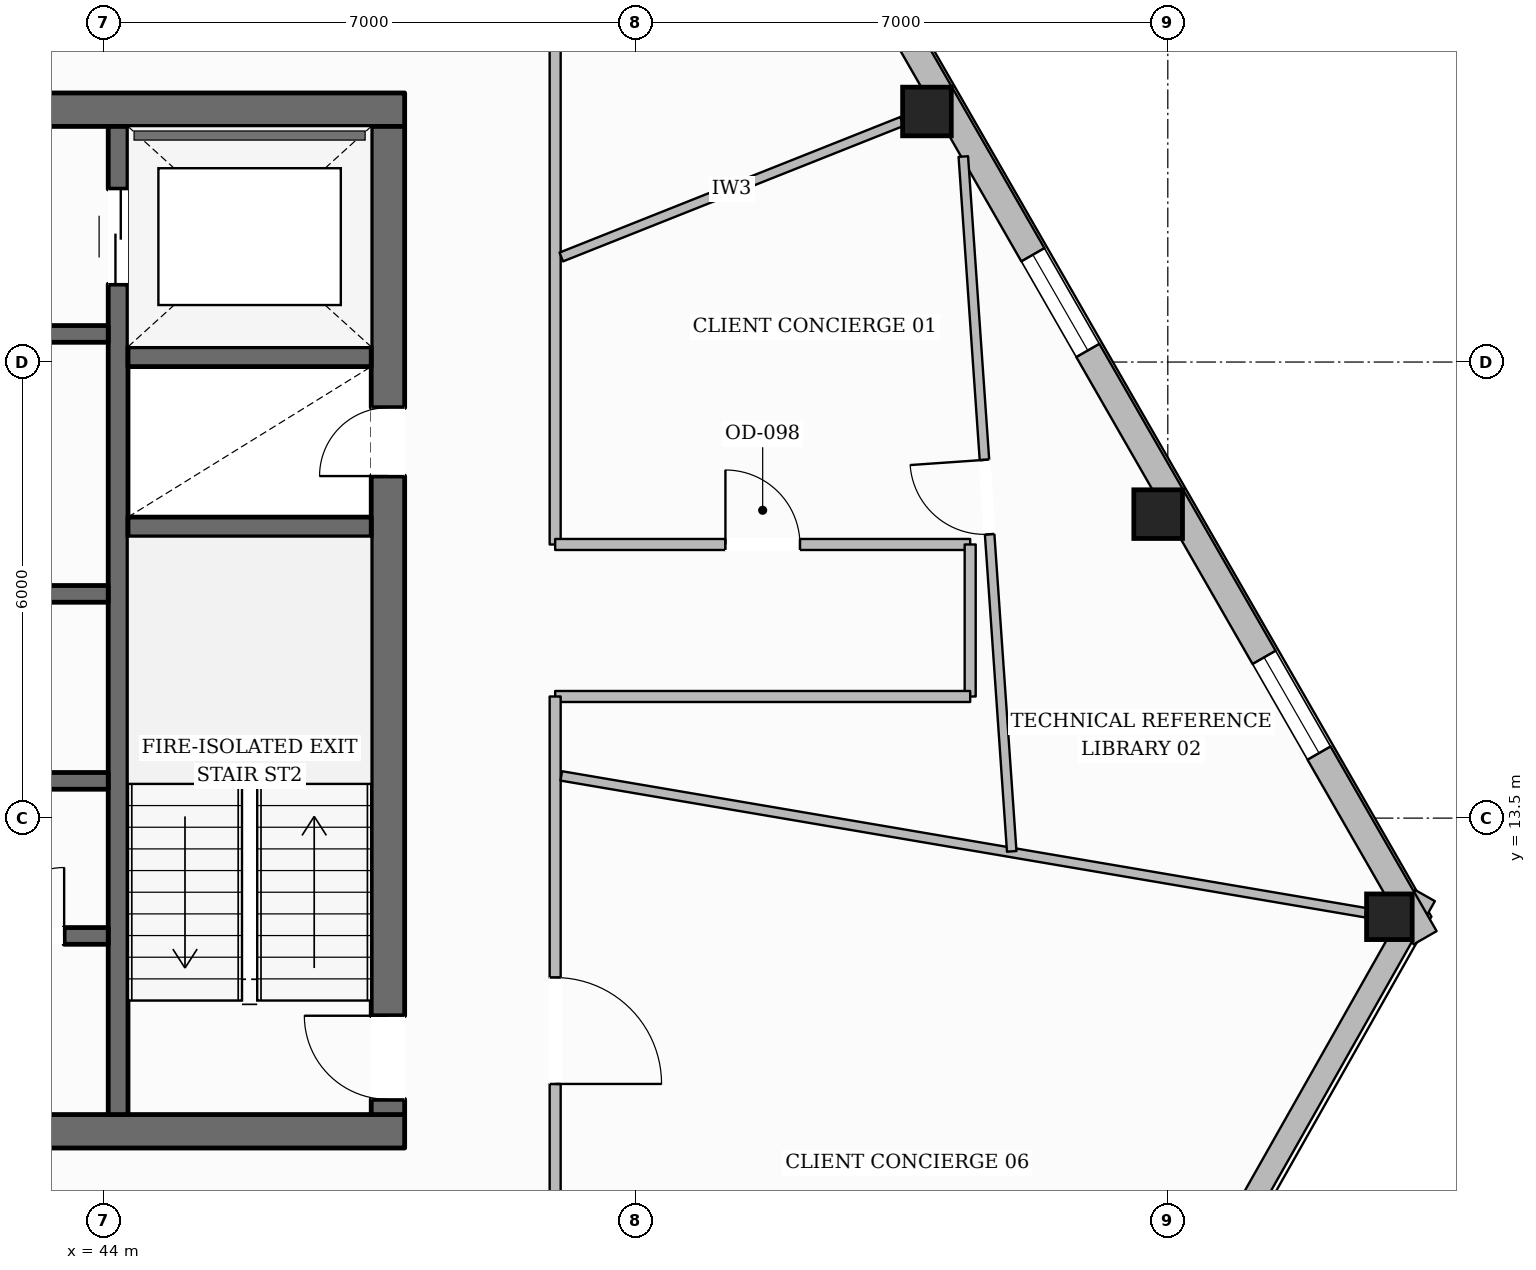
"""IFC4 building model, lengths in metres.
Left out: names, types, materials, properties, quantities, classifications, styles, units other than length and angle.
Written with IfcOpenShell. Run it as: python <this file> out.ifc"""

import sys

from ifc_helpers import new_model, si_unit, direction, frame, frame_2d, origin, origin_2d, place, context, subcontext, project, spatial, rectangle, hollow_rectangle, extrude, element, fill, save


model = new_model("IFC4")
c1 = context("Model", 3, precision=1e-05, world=origin(), true_north=direction((0.0, 1.0)))
c2 = subcontext(c1, "Body", "Model", "MODEL_VIEW")
j1 = project(units=[si_unit("LENGTHUNIT", "METRE"), si_unit("PLANEANGLEUNIT", "RADIAN")], contexts=[c1])
p1 = place(None, origin())
s1 = spatial("IfcSite", under=j1, at=p1, CompositionType="ELEMENT")
p2 = place(p1, origin())
s2 = spatial("IfcBuilding", under=s1, at=p2, CompositionType="ELEMENT")
p3 = place(p2, frame((0.0, 0.0, 172.7)))
s3 = spatial("IfcBuildingStorey", under=s2, at=p3, CompositionType="ELEMENT", Elevation=172.7)
p4 = place(p3, frame((28.04, 9.38, 0.0), z_axis=(0.0, 0.0, 1.0), x_axis=(1.0, 0.0, 0.0)))
e1 = element("IfcWall", 1, at=p4, inside=s3, PredefinedType="SOLIDWALL", context=c2, shape_type="SweptSolid", body=[
    extrude(rectangle(XDim=19.92, YDim=0.44, at=frame_2d((9.96, 0.0))), origin(), (0.0, 0.0, 1.0), 3.6),
])
p5 = place(p4, frame((10.46, 0.0, 0.0)))
e2 = element("IfcOpeningElement", 2, at=p5, cuts=e1, PredefinedType="OPENING", context=c2, shape_type="SweptSolid", body=[
    extrude(rectangle(XDim=1.4, YDim=2.2, at=frame_2d((0.7, 1.1))), frame((0.0, 0.23, 0.0), z_axis=(0.0, -1.0, 0.0), x_axis=(1.0, 0.0, 0.0)), (0.0, 0.0, 1.0), 0.46),
])
p6 = place(p3, frame((28.04, 22.82, 0.0), z_axis=(0.0, 0.0, 1.0), x_axis=(1.0, 0.0, 0.0)))
e3 = element("IfcWall", 3, at=p6, inside=s3, PredefinedType="SOLIDWALL", context=c2, shape_type="SweptSolid", body=[
    extrude(rectangle(XDim=19.92, YDim=0.44, at=frame_2d((9.96, 0.0))), origin(), (0.0, 0.0, 1.0), 3.6),
])
p7 = place(p6, frame((6.235, 0.0, 0.0)))
e4 = element("IfcOpeningElement", 4, at=p7, cuts=e3, PredefinedType="OPENING", context=c2, shape_type="SweptSolid", body=[
    extrude(rectangle(XDim=1.05, YDim=2.15, at=frame_2d((0.525, 1.075))), frame((0.0, 0.23, 0.0), z_axis=(0.0, -1.0, 0.0), x_axis=(1.0, 0.0, 0.0)), (0.0, 0.0, 1.0), 0.46),
])
p8 = place(p6, frame((12.635, 0.0, 0.0)))
e5 = element("IfcOpeningElement", 5, at=p8, cuts=e3, PredefinedType="OPENING", context=c2, shape_type="SweptSolid", body=[
    extrude(rectangle(XDim=1.05, YDim=2.15, at=frame_2d((0.525, 1.075))), frame((0.0, 0.23, 0.0), z_axis=(0.0, -1.0, 0.0), x_axis=(1.0, 0.0, 0.0)), (0.0, 0.0, 1.0), 0.46),
])
p9 = place(p3, frame((47.74, 9.6, 0.0), z_axis=(0.0, 0.0, 1.0), x_axis=(0.0, 1.0, 0.0)))
e6 = element("IfcWall", 6, at=p9, inside=s3, PredefinedType="SOLIDWALL", context=c2, shape_type="SweptSolid", body=[
    extrude(rectangle(XDim=13.0, YDim=0.44, at=frame_2d((6.5, 0.0))), origin(), (0.0, 0.0, 1.0), 3.6),
])
p10 = place(p9, frame((0.2, 0.0, 0.0)))
e7 = element("IfcOpeningElement", 7, at=p10, cuts=e6, PredefinedType="OPENING", context=c2, shape_type="SweptSolid", body=[
    extrude(rectangle(XDim=1.1, YDim=2.15, at=frame_2d((0.55, 1.075))), frame((0.0, 0.23, 0.0), z_axis=(0.0, -1.0, 0.0), x_axis=(1.0, 0.0, 0.0)), (0.0, 0.0, 1.0), 0.46),
])
p11 = place(p9, frame((8.4, 0.0, 0.0)))
e8 = element("IfcOpeningElement", 8, at=p11, cuts=e6, PredefinedType="OPENING", context=c2, shape_type="SweptSolid", body=[
    extrude(rectangle(XDim=0.9, YDim=2.1, at=frame_2d((0.45, 1.05))), frame((0.0, 0.23, 0.0), z_axis=(0.0, -1.0, 0.0), x_axis=(1.0, 0.0, 0.0)), (0.0, 0.0, 1.0), 0.46),
])
p12 = place(p3, frame((44.19, 9.6, 0.0), z_axis=(0.0, 0.0, 1.0), x_axis=(0.0, 1.0, 0.0)))
e9 = element("IfcWall", 9, at=p12, inside=s3, PredefinedType="SHEAR", context=c2, shape_type="SweptSolid", body=[
    extrude(rectangle(XDim=13.0, YDim=0.26, at=frame_2d((6.5, 0.0))), origin(), (0.0, 0.0, 1.0), 3.6),
])
p13 = place(p12, frame((10.925, 0.0, 0.0)))
e10 = element("IfcOpeningElement", 10, at=p13, cuts=e9, PredefinedType="OPENING", context=c2, shape_type="SweptSolid", body=[
    extrude(rectangle(XDim=1.25, YDim=2.25, at=frame_2d((0.625, 1.125))), frame((0.0, 0.14, 0.0), z_axis=(0.0, -1.0, 0.0), x_axis=(1.0, 0.0, 0.0)), (0.0, 0.0, 1.0), 0.28),
])
for number, where, z_axis, x_axis in (
    (11, (44.32, 17.33, 0.0), (0.0, 0.0, 1.0), (1.0, 0.0, 0.0)),
    (12, (44.32, 19.57, 0.0), (0.0, 0.0, 1.0), (1.0, 0.0, 0.0)),
):
    element("IfcWall", number, at=place(p3, frame(where, z_axis=z_axis, x_axis=x_axis)), inside=s3, PredefinedType="SHEAR", context=c2, shape_type="SweptSolid", body=[
        extrude(rectangle(XDim=3.2, YDim=0.26, at=frame_2d((1.6, 0.0))), origin(), (0.0, 0.0, 1.0), 3.6),
    ])
p14 = place(p3, frame((31.94, 19.87, 0.0), z_axis=(0.0, 0.0, 1.0), x_axis=(1.0, 0.0, 0.0)))
e13 = element("IfcWall", 13, at=p14, inside=s3, PredefinedType="SOLIDWALL", context=c2, shape_type="SweptSolid", body=[
    extrude(rectangle(XDim=12.12, YDim=0.22, at=frame_2d((6.06, 0.0))), origin(), (0.0, 0.0, 1.0), 3.6),
])
p15 = place(p14, frame((6.3, 0.0, 0.0)))
e14 = element("IfcOpeningElement", 14, at=p15, cuts=e13, PredefinedType="OPENING", context=c2, shape_type="SweptSolid", body=[
    extrude(rectangle(XDim=1.1, YDim=2.15, at=frame_2d((0.55, 1.075))), frame((0.0, 0.12, 0.0), z_axis=(0.0, -1.0, 0.0), x_axis=(1.0, 0.0, 0.0)), (0.0, 0.0, 1.0), 0.24),
])
p16 = place(p14, frame((8.01, 0.0, 0.0)))
e15 = element("IfcOpeningElement", 15, at=p16, cuts=e13, PredefinedType="OPENING", context=c2, shape_type="SweptSolid", body=[
    extrude(rectangle(XDim=0.9, YDim=2.1, at=frame_2d((0.45, 1.05))), frame((0.0, 0.12, 0.0), z_axis=(0.0, -1.0, 0.0), x_axis=(1.0, 0.0, 0.0)), (0.0, 0.0, 1.0), 0.24),
])
p17 = place(p14, frame((10.21, 0.0, 0.0)))
e16 = element("IfcOpeningElement", 16, at=p17, cuts=e13, PredefinedType="OPENING", context=c2, shape_type="SweptSolid", body=[
    extrude(rectangle(XDim=0.9, YDim=2.1, at=frame_2d((0.45, 1.05))), frame((0.0, 0.12, 0.0), z_axis=(0.0, -1.0, 0.0), x_axis=(1.0, 0.0, 0.0)), (0.0, 0.0, 1.0), 0.24),
])
p18 = place(p3, frame((31.94, 16.45, 0.0), z_axis=(0.0, 0.0, 1.0), x_axis=(1.0, 0.0, 0.0)))
e17 = element("IfcWall", 17, at=p18, inside=s3, PredefinedType="SOLIDWALL", context=c2, shape_type="SweptSolid", body=[
    extrude(rectangle(XDim=12.12, YDim=0.22, at=frame_2d((6.06, 0.0))), origin(), (0.0, 0.0, 1.0), 3.6),
])
p19 = place(p3, frame((31.94, 13.99, 0.0), z_axis=(0.0, 0.0, 1.0), x_axis=(1.0, 0.0, 0.0)))
e18 = element("IfcWall", 18, at=p19, inside=s3, PredefinedType="SOLIDWALL", context=c2, shape_type="SweptSolid", body=[
    extrude(rectangle(XDim=12.12, YDim=0.22, at=frame_2d((6.06, 0.0))), origin(), (0.0, 0.0, 1.0), 3.6),
])
p20 = place(p19, frame((1.11, 0.0, 0.0)))
e19 = element("IfcOpeningElement", 19, at=p20, cuts=e18, PredefinedType="OPENING", context=c2, shape_type="SweptSolid", body=[
    extrude(rectangle(XDim=0.9, YDim=2.1, at=frame_2d((0.45, 1.05))), frame((0.0, 0.12, 0.0), z_axis=(0.0, -1.0, 0.0), x_axis=(1.0, 0.0, 0.0)), (0.0, 0.0, 1.0), 0.24),
])
p21 = place(p19, frame((5.16, 0.0, 0.0)))
e20 = element("IfcOpeningElement", 20, at=p21, cuts=e18, PredefinedType="OPENING", context=c2, shape_type="SweptSolid", body=[
    extrude(rectangle(XDim=0.9, YDim=2.1, at=frame_2d((0.45, 1.05))), frame((0.0, 0.12, 0.0), z_axis=(0.0, -1.0, 0.0), x_axis=(1.0, 0.0, 0.0)), (0.0, 0.0, 1.0), 0.24),
])
p22 = place(p19, frame((9.61, 0.0, 0.0)))
e21 = element("IfcOpeningElement", 21, at=p22, cuts=e18, PredefinedType="OPENING", context=c2, shape_type="SweptSolid", body=[
    extrude(rectangle(XDim=0.9, YDim=2.1, at=frame_2d((0.45, 1.05))), frame((0.0, 0.12, 0.0), z_axis=(0.0, -1.0, 0.0), x_axis=(1.0, 0.0, 0.0)), (0.0, 0.0, 1.0), 0.24),
])
p23 = place(p3, frame((40.28, 11.95, 0.0), z_axis=(0.0, 0.0, 1.0), x_axis=(1.0, 0.0, 0.0)))
e22 = element("IfcWall", 22, at=p23, inside=s3, PredefinedType="SOLIDWALL", context=c2, shape_type="SweptSolid", body=[
    extrude(rectangle(XDim=3.78, YDim=0.22, at=frame_2d((1.89, 0.0))), origin(), (0.0, 0.0, 1.0), 3.6),
])
p24 = place(p23, frame((0.47, 0.0, 0.0)))
e23 = element("IfcOpeningElement", 23, at=p24, cuts=e22, PredefinedType="OPENING", context=c2, shape_type="SweptSolid", body=[
    extrude(rectangle(XDim=0.9, YDim=2.1, at=frame_2d((0.45, 1.05))), frame((0.0, 0.12, 0.0), z_axis=(0.0, -1.0, 0.0), x_axis=(1.0, 0.0, 0.0)), (0.0, 0.0, 1.0), 0.24),
])
p25 = place(p23, frame((2.3, 0.0, 0.0)))
e24 = element("IfcOpeningElement", 24, at=p25, cuts=e22, PredefinedType="OPENING", context=c2, shape_type="SweptSolid", body=[
    extrude(rectangle(XDim=0.9, YDim=2.1, at=frame_2d((0.45, 1.05))), frame((0.0, 0.12, 0.0), z_axis=(0.0, -1.0, 0.0), x_axis=(1.0, 0.0, 0.0)), (0.0, 0.0, 1.0), 0.24),
])
p26 = place(p3, frame((60.915, 12.202, 0.0), z_axis=(0.0, 0.0, 1.0), x_axis=(1.0, 0.0, 0.0)))
e25 = element("IfcColumn", 25, at=p26, inside=s3, PredefinedType="COLUMN", context=c2, shape_type="SweptSolid", body=[
    extrude(hollow_rectangle(XDim=0.6, YDim=0.6, WallThickness=0.028, at=origin_2d()), origin(), (0.0, 0.0, 1.0), 3.6),
])
for number, where, z_axis, x_axis in (
    (26, (57.873, 17.499, 0.0), (0.0, 0.0, 1.0), (1.0, 0.0, 0.0)),
    (27, (54.831, 22.796, 0.0), (0.0, 0.0, 1.0), (1.0, 0.0, 0.0)),
):
    element("IfcColumn", number, at=place(p3, frame(where, z_axis=z_axis, x_axis=x_axis)), inside=s3, PredefinedType="COLUMN", context=c2, shape_type="SweptSolid", body=[
        extrude(hollow_rectangle(XDim=0.64, YDim=0.64, WallThickness=0.028, at=origin_2d()), origin(), (0.0, 0.0, 1.0), 3.6),
    ])
p27 = place(p3, frame((61.383, 12.481, 0.0), z_axis=(0.0, 0.0, 1.0), x_axis=(-0.492449334401, -0.87034111304, 0.0)))
e28 = element("IfcWall", 28, at=p27, inside=s3, PredefinedType="STANDARD", context=c2, shape_type="SweptSolid", body=[
    extrude(rectangle(XDim=10.217, YDim=0.3, at=frame_2d((5.108, 0.0))), origin(), (0.0, 0.0, 1.0), 3.132),
])
p28 = place(p27, frame((4.583, 0.0, 0.65)))
e29 = element("IfcOpeningElement", 29, at=p28, cuts=e28, PredefinedType="OPENING", context=c2, shape_type="SweptSolid", body=[
    extrude(rectangle(XDim=1.05, YDim=1.7, at=frame_2d((0.525, 0.85))), frame((0.0, 0.16, 0.0), z_axis=(0.0, -1.0, 0.0), x_axis=(1.0, 0.0, 0.0)), (0.0, 0.0, 1.0), 0.32),
])
p29 = place(p3, frame((42.661, 44.531, 0.0), z_axis=(0.0, 0.0, 1.0), x_axis=(0.497996481168, -0.867179049991, 0.0)))
e30 = element("IfcWall", 30, at=p29, inside=s3, PredefinedType="STANDARD", context=c2, shape_type="SweptSolid", body=[
    extrude(rectangle(XDim=37.599, YDim=0.35, at=frame_2d((18.799, 0.0))), origin(), (0.0, 0.0, 1.0), 3.132),
])
p30 = place(p29, frame((33.346, 0.0, 0.65)))
e31 = element("IfcOpeningElement", 31, at=p30, cuts=e30, PredefinedType="OPENING", context=c2, shape_type="SweptSolid", body=[
    extrude(rectangle(XDim=1.45, YDim=1.75, at=frame_2d((0.725, 0.875))), frame((0.0, 0.185, 0.0), z_axis=(0.0, -1.0, 0.0), x_axis=(1.0, 0.0, 0.0)), (0.0, 0.0, 1.0), 0.37),
])
p31 = place(p29, frame((27.238, 0.0, 0.65)))
e32 = element("IfcOpeningElement", 32, at=p31, cuts=e30, PredefinedType="OPENING", context=c2, shape_type="SweptSolid", body=[
    extrude(rectangle(XDim=1.45, YDim=1.75, at=frame_2d((0.725, 0.875))), frame((0.0, 0.185, 0.0), z_axis=(0.0, -1.0, 0.0), x_axis=(1.0, 0.0, 0.0)), (0.0, 0.0, 1.0), 0.37),
])
p32 = place(p29, frame((15.021, 0.0, 0.65)))
e33 = element("IfcOpeningElement", 33, at=p32, cuts=e30, PredefinedType="OPENING", context=c2, shape_type="SweptSolid", body=[
    extrude(rectangle(XDim=1.45, YDim=1.75, at=frame_2d((0.725, 0.875))), frame((0.0, 0.185, 0.0), z_axis=(0.0, -1.0, 0.0), x_axis=(1.0, 0.0, 0.0)), (0.0, 0.0, 1.0), 0.37),
])
p33 = place(p29, frame((8.913, 0.0, 0.65)))
e34 = element("IfcOpeningElement", 34, at=p33, cuts=e30, PredefinedType="OPENING", context=c2, shape_type="SweptSolid", body=[
    extrude(rectangle(XDim=1.45, YDim=1.75, at=frame_2d((0.725, 0.875))), frame((0.0, 0.185, 0.0), z_axis=(0.0, -1.0, 0.0), x_axis=(1.0, 0.0, 0.0)), (0.0, 0.0, 1.0), 0.37),
])
p34 = place(p29, frame((2.805, 0.0, 0.65)))
e35 = element("IfcOpeningElement", 35, at=p34, cuts=e30, PredefinedType="OPENING", context=c2, shape_type="SweptSolid", body=[
    extrude(rectangle(XDim=1.45, YDim=1.75, at=frame_2d((0.725, 0.875))), frame((0.0, 0.185, 0.0), z_axis=(0.0, -1.0, 0.0), x_axis=(1.0, 0.0, 0.0)), (0.0, 0.0, 1.0), 0.37),
])
p35 = place(p3, frame((49.94, 25.02, 0.0), z_axis=(0.0, 0.0, 1.0), x_axis=(0.0, -1.0, 0.0)))
e36 = element("IfcWall", 36, at=p35, inside=s3, PredefinedType="PARTITIONING", context=c2, shape_type="SweptSolid", body=[
    extrude(rectangle(XDim=7.92, YDim=0.145, at=frame_2d((3.96, 0.0))), origin(), (0.0, 0.0, 1.0), 3.339),
])
p36 = place(p3, frame((49.94, 17.1, 0.0), z_axis=(0.0, 0.0, 1.0), x_axis=(1.0, 0.0, 0.0)))
e37 = element("IfcWall", 37, at=p36, inside=s3, PredefinedType="PARTITIONING", context=c2, shape_type="SweptSolid", body=[
    extrude(rectangle(XDim=5.46, YDim=0.145, at=frame_2d((2.73, 0.0))), origin(), (0.0, 0.0, 1.0), 3.6),
])
p37 = place(p36, frame((2.24, 0.0, 0.0)))
e38 = element("IfcOpeningElement", 38, at=p37, cuts=e37, PredefinedType="OPENING", context=c2, shape_type="SweptSolid", body=[
    extrude(rectangle(XDim=0.98, YDim=2.15, at=frame_2d((0.49, 1.075))), frame((0.0, 0.083, 0.0), z_axis=(0.0, -1.0, 0.0), x_axis=(1.0, 0.0, 0.0)), (0.0, 0.0, 1.0), 0.165),
])
p38 = place(p3, frame((55.4, 17.1, 0.0), z_axis=(0.0, 0.0, 1.0), x_axis=(0.0, -1.0, 0.0)))
e39 = element("IfcWall", 39, at=p38, inside=s3, PredefinedType="PARTITIONING", context=c2, shape_type="SweptSolid", body=[
    extrude(rectangle(XDim=2.0, YDim=0.145, at=frame_2d((1.0, 0.0))), origin(), (0.0, 0.0, 1.0), 3.339),
])
p39 = place(p3, frame((55.4, 15.1, 0.0), z_axis=(0.0, 0.0, 1.0), x_axis=(-1.0, 0.0, 0.0)))
e40 = element("IfcWall", 40, at=p39, inside=s3, PredefinedType="PARTITIONING", context=c2, shape_type="SweptSolid", body=[
    extrude(rectangle(XDim=5.46, YDim=0.145, at=frame_2d((2.73, 0.0))), origin(), (0.0, 0.0, 1.0), 3.6),
])
p40 = place(p3, frame((49.94, 15.1, 0.0), z_axis=(0.0, 0.0, 1.0), x_axis=(0.0, -1.0, 0.0)))
e41 = element("IfcWall", 41, at=p40, inside=s3, PredefinedType="PARTITIONING", context=c2, shape_type="SweptSolid", body=[
    extrude(rectangle(XDim=7.92, YDim=0.145, at=frame_2d((3.96, 0.0))), origin(), (0.0, 0.0, 1.0), 3.6),
])
p41 = place(p40, frame((3.697, 0.0, 0.0)))
e42 = element("IfcOpeningElement", 42, at=p41, cuts=e41, PredefinedType="OPENING", context=c2, shape_type="SweptSolid", body=[
    extrude(rectangle(XDim=1.4, YDim=2.2, at=frame_2d((0.7, 1.1))), frame((0.0, 0.083, 0.0), z_axis=(0.0, -1.0, 0.0), x_axis=(1.0, 0.0, 0.0)), (0.0, 0.0, 1.0), 0.165),
])
p42 = place(p3, frame((50.021, 20.882, 0.0), z_axis=(0.0, 0.0, 1.0), x_axis=(0.929162633027, 0.369671207138, 0.0)))
e43 = element("IfcWall", 43, at=p42, inside=s3, PredefinedType="PARTITIONING", context=c2, shape_type="SweptSolid", body=[
    extrude(rectangle(XDim=4.824, YDim=0.125, at=frame_2d((2.412, 0.0))), origin(), (0.0, 0.0, 1.0), 3.6),
])
p43 = place(p3, frame((50.021, 14.055, 0.0), z_axis=(0.0, 0.0, 1.0), x_axis=(0.985839088175, -0.167694043503, 0.0)))
e44 = element("IfcWall", 44, at=p43, inside=s3, PredefinedType="PARTITIONING", context=c2, shape_type="SweptSolid", body=[
    extrude(rectangle(XDim=10.739, YDim=0.125, at=frame_2d((5.369, 0.0))), origin(), (0.0, 0.0, 1.0), 3.141),
])
p44 = place(p3, frame((55.947, 13.062, 0.0), z_axis=(0.0, 0.0, 1.0), x_axis=(-0.069486038833, 0.997582924076, 0.0)))
e45 = element("IfcWall", 45, at=p44, inside=s3, PredefinedType="PARTITIONING", context=c2, shape_type="SweptSolid", body=[
    extrude(rectangle(XDim=9.163, YDim=0.125, at=frame_2d((4.582, 0.0))), origin(), (0.0, 0.0, 1.0), 3.135),
])
p45 = place(p44, frame((4.183, 0.0, 0.0)))
e46 = element("IfcOpeningElement", 46, at=p45, cuts=e45, PredefinedType="OPENING", context=c2, shape_type="SweptSolid", body=[
    extrude(rectangle(XDim=0.98, YDim=2.15, at=frame_2d((0.49, 1.075))), frame((0.0, 0.073, 0.0), z_axis=(0.0, -1.0, 0.0), x_axis=(1.0, 0.0, 0.0)), (0.0, 0.0, 1.0), 0.145),
])
p46 = place(p30, origin())
e47 = element("IfcWindow", 47, at=p46, inside=s3, PartitioningType="SINGLE_PANEL", PredefinedType="WINDOW", context=c2, shape_type="SweptSolid", body=[
    extrude(rectangle(XDim=1.45, YDim=1.75, at=frame_2d((0.725, 0.875))), frame((0.0, 0.03, 0.0), z_axis=(0.0, -1.0, 0.0), x_axis=(1.0, 0.0, 0.0)), (0.0, 0.0, 1.0), 0.06),
])
fill(e31, e47)
p47 = place(p31, origin())
e48 = element("IfcWindow", 48, at=p47, inside=s3, PartitioningType="SINGLE_PANEL", PredefinedType="WINDOW", context=c2, shape_type="SweptSolid", body=[
    extrude(rectangle(XDim=1.45, YDim=1.75, at=frame_2d((0.725, 0.875))), frame((0.0, 0.03, 0.0), z_axis=(0.0, -1.0, 0.0), x_axis=(1.0, 0.0, 0.0)), (0.0, 0.0, 1.0), 0.06),
])
fill(e32, e48)
p48 = place(p10, origin())
e49 = element("IfcDoor", 49, at=p48, inside=s3, OperationType="SINGLE_SWING_RIGHT", PredefinedType="DOOR", context=c2, shape_type="SweptSolid", body=[
    extrude(rectangle(XDim=1.1, YDim=2.15, at=frame_2d((0.55, 1.075))), frame((0.0, 0.025, 0.0), z_axis=(0.0, -1.0, 0.0), x_axis=(1.0, 0.0, 0.0)), (0.0, 0.0, 1.0), 0.05),
])
fill(e7, e49)
p49 = place(p11, origin())
e50 = element("IfcDoor", 50, at=p49, inside=s3, OperationType="SINGLE_SWING_LEFT", PredefinedType="DOOR", context=c2, shape_type="SweptSolid", body=[
    extrude(rectangle(XDim=0.9, YDim=2.1, at=frame_2d((0.45, 1.05))), frame((0.0, 0.025, 0.0), z_axis=(0.0, -1.0, 0.0), x_axis=(1.0, 0.0, 0.0)), (0.0, 0.0, 1.0), 0.05),
])
fill(e8, e50)
p50 = place(p13, origin())
e51 = element("IfcDoor", 51, at=p50, inside=s3, OperationType="DOUBLE_DOOR_SLIDING", PredefinedType="DOOR", context=c2, shape_type="SweptSolid", body=[
    extrude(rectangle(XDim=1.25, YDim=2.25, at=frame_2d((0.625, 1.125))), frame((0.0, 0.025, 0.0), z_axis=(0.0, -1.0, 0.0), x_axis=(1.0, 0.0, 0.0)), (0.0, 0.0, 1.0), 0.05),
])
fill(e10, e51)
p51 = place(p25, origin())
e52 = element("IfcDoor", 52, at=p51, inside=s3, OperationType="SINGLE_SWING_RIGHT", PredefinedType="DOOR", context=c2, shape_type="SweptSolid", body=[
    extrude(rectangle(XDim=0.9, YDim=2.1, at=frame_2d((0.45, 1.05))), frame((0.0, 0.025, 0.0), z_axis=(0.0, -1.0, 0.0), x_axis=(1.0, 0.0, 0.0)), (0.0, 0.0, 1.0), 0.05),
])
fill(e24, e52)
p52 = place(p37, origin())
e53 = element("IfcDoor", 53, at=p52, inside=s3, OperationType="SINGLE_SWING_LEFT", PredefinedType="DOOR", context=c2, shape_type="SweptSolid", body=[
    extrude(rectangle(XDim=0.98, YDim=2.15, at=frame_2d((0.49, 1.075))), frame((0.0, 0.025, 0.0), z_axis=(0.0, -1.0, 0.0), x_axis=(1.0, 0.0, 0.0)), (0.0, 0.0, 1.0), 0.05),
])
fill(e38, e53)
p53 = place(p45, origin())
e54 = element("IfcDoor", 54, at=p53, inside=s3, OperationType="SINGLE_SWING_RIGHT", PredefinedType="DOOR", context=c2, shape_type="SweptSolid", body=[
    extrude(rectangle(XDim=0.98, YDim=2.15, at=frame_2d((0.49, 1.075))), frame((0.0, 0.025, 0.0), z_axis=(0.0, -1.0, 0.0), x_axis=(1.0, 0.0, 0.0)), (0.0, 0.0, 1.0), 0.05),
])
fill(e46, e54)
p54 = place(p41, origin())
e55 = element("IfcDoor", 55, at=p54, inside=s3, OperationType="SINGLE_SWING_RIGHT", PredefinedType="DOOR", context=c2, shape_type="SweptSolid", body=[
    extrude(rectangle(XDim=1.4, YDim=2.2, at=frame_2d((0.7, 1.1))), frame((0.0, 0.025, 0.0), z_axis=(0.0, -1.0, 0.0), x_axis=(1.0, 0.0, 0.0)), (0.0, 0.0, 1.0), 0.05),
])
fill(e42, e55)
save(model, sys.argv[1])
